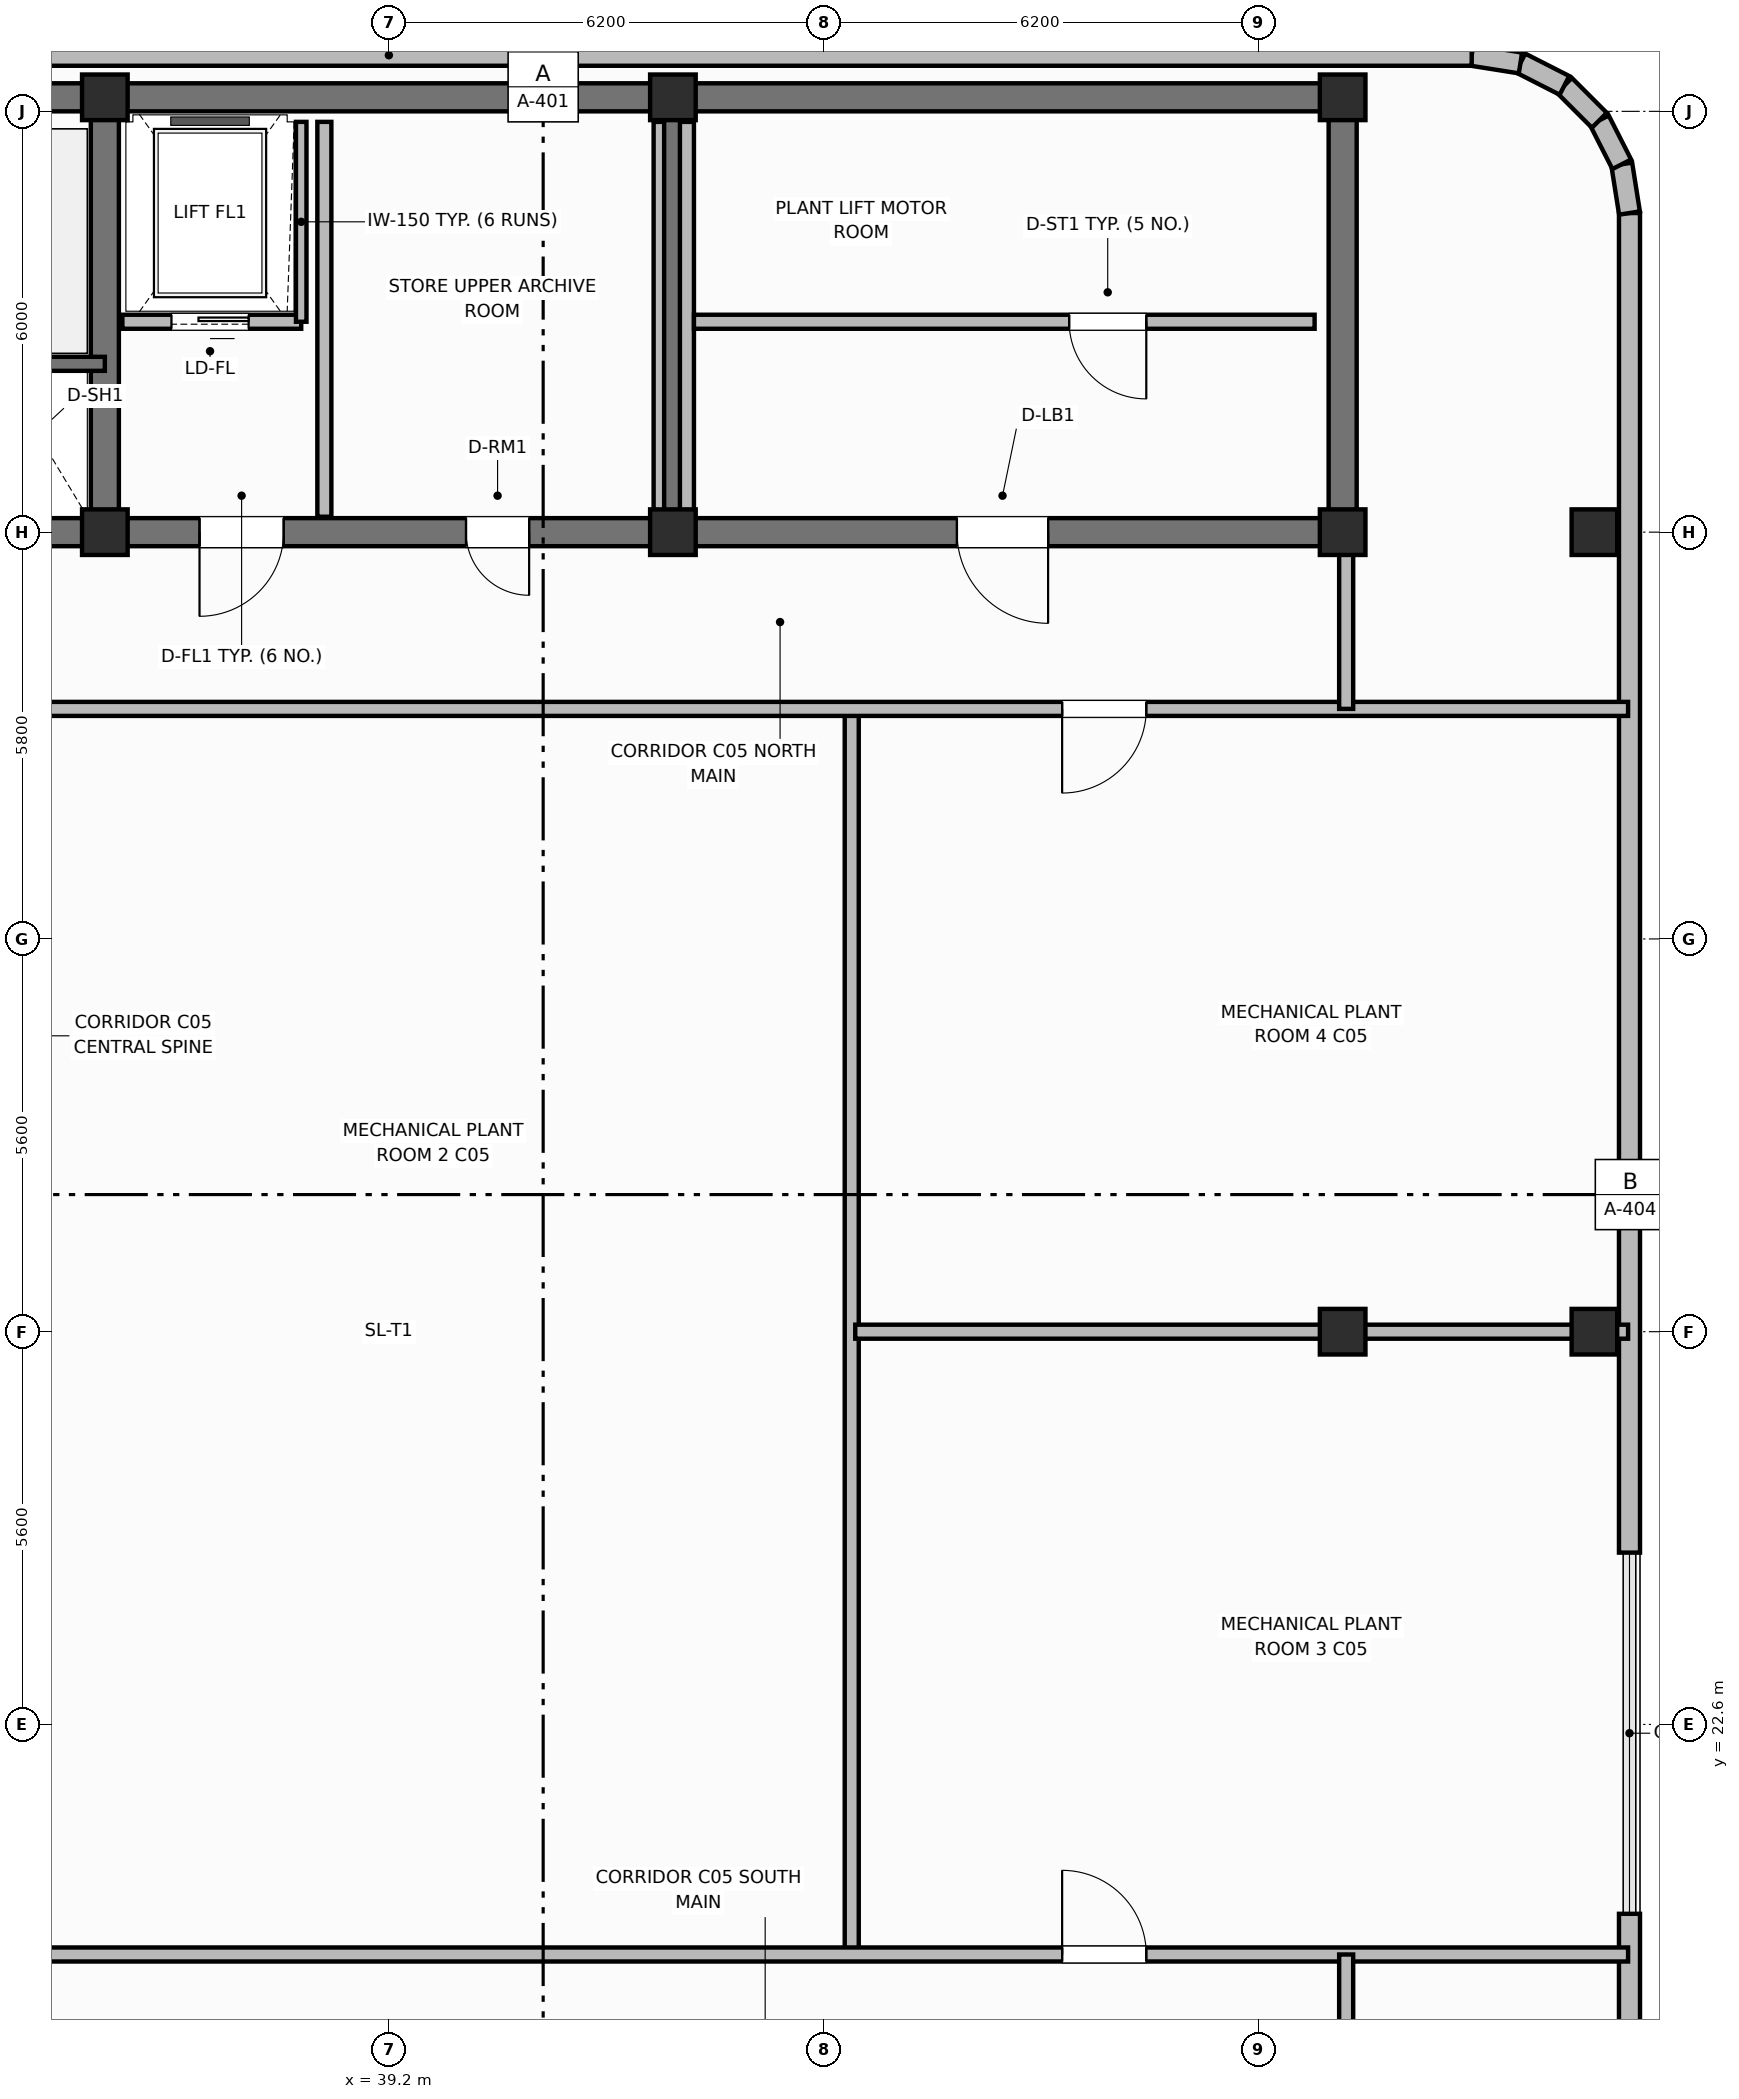
"""IFC4 building model, lengths in metres.
Left out: names, types, materials, properties, quantities, classifications, styles, units other than length and angle.
Written with IfcOpenShell. Run it as: python <this file> out.ifc"""

import sys

from ifc_helpers import new_model, si_unit, direction, frame, frame_2d, origin, origin_2d, place, context, subcontext, project, spatial, rectangle, extrude, element, fill, save


model = new_model("IFC4")
c1 = context("Model", 3, precision=1e-05, world=origin(), true_north=direction((0.0, 1.0)))
c2 = subcontext(c1, "Body", "Model", "MODEL_VIEW")
j1 = project(units=[si_unit("LENGTHUNIT", "METRE"), si_unit("PLANEANGLEUNIT", "RADIAN")], contexts=[c1])
p1 = place(None, origin())
s1 = spatial("IfcSite", under=j1, at=p1, CompositionType="ELEMENT")
p2 = place(p1, origin())
s2 = spatial("IfcBuilding", under=s1, at=p2, CompositionType="ELEMENT")
p3 = place(p2, frame((0.0, 0.0, 316.4)))
s3 = spatial("IfcBuildingStorey", under=s2, at=p3, CompositionType="ELEMENT", Elevation=316.4)
p4 = place(p3, frame((25.6, 45.8, 0.0), z_axis=(0.0, 0.0, 1.0), x_axis=(1.0, 0.0, 0.0)))
e1 = element("IfcWall", 1, at=p4, inside=s3, PredefinedType="SHEAR", context=c2, shape_type="SweptSolid", body=[
    extrude(rectangle(XDim=27.2, YDim=0.4, at=frame_2d((13.6, 0.0))), origin(), (0.0, 0.0, 1.0), 3.6),
])
p5 = place(p3, frame((52.8, 39.8, 0.0), z_axis=(0.0, 0.0, 1.0), x_axis=(0.0, 1.0, 0.0)))
e2 = element("IfcWall", 2, at=p5, inside=s3, PredefinedType="SHEAR", context=c2, shape_type="SweptSolid", body=[
    extrude(rectangle(XDim=5.8, YDim=0.4, at=frame_2d((2.9, 0.0))), origin(), (0.0, 0.0, 1.0), 3.6),
])
p6 = place(p3, frame((52.8, 39.6, 0.0), z_axis=(0.0, 0.0, 1.0), x_axis=(-1.0, 0.0, 0.0)))
e3 = element("IfcWall", 3, at=p6, inside=s3, PredefinedType="SHEAR", context=c2, shape_type="SweptSolid", body=[
    extrude(rectangle(XDim=27.2, YDim=0.4, at=frame_2d((13.6, 0.0))), origin(), (0.0, 0.0, 1.0), 3.6),
])
p7 = place(p6, frame((24.2, 0.0, 0.0)))
e4 = element("IfcOpeningElement", 4, at=p7, cuts=e3, PredefinedType="OPENING", context=c2, shape_type="SweptSolid", body=[
    extrude(rectangle(XDim=1.1, YDim=2.15, at=frame_2d((0.55, 1.075))), frame((0.0, 0.21, 0.0), z_axis=(0.0, -1.0, 0.0), x_axis=(1.0, 0.0, 0.0)), (0.0, 0.0, 1.0), 0.42),
])
p8 = place(p6, frame((15.1, 0.0, 0.0)))
e5 = element("IfcOpeningElement", 5, at=p8, cuts=e3, PredefinedType="OPENING", context=c2, shape_type="SweptSolid", body=[
    extrude(rectangle(XDim=1.2, YDim=2.15, at=frame_2d((0.6, 1.075))), frame((0.0, 0.21, 0.0), z_axis=(0.0, -1.0, 0.0), x_axis=(1.0, 0.0, 0.0)), (0.0, 0.0, 1.0), 0.42),
])
p9 = place(p6, frame((11.6, 0.0, 0.0)))
e6 = element("IfcOpeningElement", 6, at=p9, cuts=e3, PredefinedType="OPENING", context=c2, shape_type="SweptSolid", body=[
    extrude(rectangle(XDim=0.9, YDim=2.1, at=frame_2d((0.45, 1.05))), frame((0.0, 0.21, 0.0), z_axis=(0.0, -1.0, 0.0), x_axis=(1.0, 0.0, 0.0)), (0.0, 0.0, 1.0), 0.42),
])
p10 = place(p6, frame((4.2, 0.0, 0.0)))
e7 = element("IfcOpeningElement", 7, at=p10, cuts=e3, PredefinedType="OPENING", context=c2, shape_type="SweptSolid", body=[
    extrude(rectangle(XDim=1.3, YDim=2.2, at=frame_2d((0.65, 1.1))), frame((0.0, 0.21, 0.0), z_axis=(0.0, -1.0, 0.0), x_axis=(1.0, 0.0, 0.0)), (0.0, 0.0, 1.0), 0.42),
])
for number, where, z_axis, x_axis in (
    (8, (35.15, 39.8, 0.0), (0.0, 0.0, 1.0), (0.0, 1.0, 0.0)),
    (9, (43.25, 39.8, 0.0), (0.0, 0.0, 1.0), (0.0, 1.0, 0.0)),
):
    element("IfcWall", number, at=place(p3, frame(where, z_axis=z_axis, x_axis=x_axis)), inside=s3, PredefinedType="SHEAR", context=c2, shape_type="SweptSolid", body=[
        extrude(rectangle(XDim=5.8, YDim=0.4, at=frame_2d((2.9, 0.0))), origin(), (0.0, 0.0, 1.0), 3.6),
    ])
for number, where, z_axis, x_axis in (
    (10, (35.15, 39.6, 0.0), (0.0, 0.0, 1.0), (1.0, 0.0, 0.0)),
    (11, (35.15, 45.8, 0.0), (0.0, 0.0, 1.0), (1.0, 0.0, 0.0)),
    (12, (43.25, 39.6, 0.0), (0.0, 0.0, 1.0), (1.0, 0.0, 0.0)),
    (13, (43.25, 45.8, 0.0), (0.0, 0.0, 1.0), (1.0, 0.0, 0.0)),
    (14, (52.8, 39.6, 0.0), (0.0, 0.0, 1.0), (1.0, 0.0, 0.0)),
    (15, (52.8, 45.8, 0.0), (0.0, 0.0, 1.0), (1.0, 0.0, 0.0)),
    (16, (52.8, 28.2, 0.0), (0.0, 0.0, 1.0), (1.0, 0.0, 0.0)),
    (17, (56.39, 28.2, 0.0), (0.0, 0.0, 1.0), (1.0, 0.0, 0.0)),
    (18, (56.39, 39.6, 0.0), (0.0, 0.0, 1.0), (1.0, 0.0, 0.0)),
):
    element("IfcColumn", number, at=place(p3, frame(where, z_axis=z_axis, x_axis=x_axis)), inside=s3, PredefinedType="COLUMN", context=c2, shape_type="SweptSolid", body=[
        extrude(rectangle(XDim=0.65, YDim=0.65, at=origin_2d()), origin(), (0.0, 0.0, 1.0), 3.6),
    ])
p11 = place(p3, frame((56.89, 12.25, 0.0), z_axis=(0.0, 0.0, 1.0), x_axis=(0.0, 1.0, 0.0)))
e19 = element("IfcWall", 19, at=p11, inside=s3, PredefinedType="SOLIDWALL", context=c2, shape_type="SweptSolid", body=[
    extrude(rectangle(XDim=7.65, YDim=0.3, at=frame_2d((3.825, 0.0))), origin(), (0.0, 0.0, 1.0), 2.84),
])
p12 = place(p3, frame((56.89, 25.05, 0.0), z_axis=(0.0, 0.0, 1.0), x_axis=(0.0, 1.0, 0.0)))
e20 = element("IfcWall", 20, at=p12, inside=s3, PredefinedType="SOLIDWALL", context=c2, shape_type="SweptSolid", body=[
    extrude(rectangle(XDim=19.1, YDim=0.3, at=frame_2d((9.55, 0.0))), origin(), (0.0, 0.0, 1.0), 2.84),
])
for number, where, z_axis, x_axis in (
    (21, (56.89, 44.15, 0.0), (0.0, 0.0, 1.0), (-0.156, 0.988, 0.0)),
    (22, (56.78, 44.845, 0.0), (0.0, 0.0, 1.0), (-0.454, 0.891, 0.0)),
):
    element("IfcWall", number, at=place(p3, frame(where, z_axis=z_axis, x_axis=x_axis)), inside=s3, PredefinedType="SOLIDWALL", context=c2, shape_type="SweptSolid", body=[
        extrude(rectangle(XDim=0.704, YDim=0.3, at=frame_2d((0.352, 0.0))), origin(), (0.0, 0.0, 1.0), 2.84),
    ])
p13 = place(p3, frame((56.46, 45.472, 0.0), z_axis=(0.0, 0.0, 1.0), x_axis=(-0.707106781187, 0.707106781187, 0.0)))
e23 = element("IfcWall", 23, at=p13, inside=s3, PredefinedType="SOLIDWALL", context=c2, shape_type="SweptSolid", body=[
    extrude(rectangle(XDim=0.704, YDim=0.3, at=frame_2d((0.352, 0.0))), origin(), (0.0, 0.0, 1.0), 2.84),
])
for number, where, z_axis, x_axis in (
    (24, (55.962, 45.97, 0.0), (0.0, 0.0, 1.0), (-0.891, 0.454, 0.0)),
    (25, (55.335, 46.29, 0.0), (0.0, 0.0, 1.0), (-0.988, 0.156, 0.0)),
):
    element("IfcWall", number, at=place(p3, frame(where, z_axis=z_axis, x_axis=x_axis)), inside=s3, PredefinedType="SOLIDWALL", context=c2, shape_type="SweptSolid", body=[
        extrude(rectangle(XDim=0.704, YDim=0.3, at=frame_2d((0.352, 0.0))), origin(), (0.0, 0.0, 1.0), 2.84),
    ])
p14 = place(p3, frame((54.64, 46.4, 0.0), z_axis=(0.0, 0.0, 1.0), x_axis=(-1.0, 0.0, 0.0)))
e26 = element("IfcWall", 26, at=p14, inside=s3, PredefinedType="SOLIDWALL", context=c2, shape_type="SweptSolid", body=[
    extrude(rectangle(XDim=30.88, YDim=0.3, at=frame_2d((15.44, 0.0))), origin(), (0.0, 0.0, 1.0), 2.84),
])
p15 = place(p3, frame((35.15, 42.0, 0.0), z_axis=(0.0, 0.0, 1.0), x_axis=(-1.0, 0.0, 0.0)))
e27 = element("IfcWall", 27, at=p15, inside=s3, PredefinedType="SHEAR", context=c2, shape_type="SweptSolid", body=[
    extrude(rectangle(XDim=9.55, YDim=0.2, at=frame_2d((4.775, 0.0))), origin(), (0.0, 0.0, 1.0), 3.6),
])
p16 = place(p15, frame((7.25, 0.0, 0.0)))
e28 = element("IfcOpeningElement", 28, at=p16, cuts=e27, PredefinedType="OPENING", context=c2, shape_type="SweptSolid", body=[
    extrude(rectangle(XDim=1.1, YDim=2.15, at=frame_2d((0.55, 1.075))), frame((0.0, 0.11, 0.0), z_axis=(0.0, -1.0, 0.0), x_axis=(1.0, 0.0, 0.0)), (0.0, 0.0, 1.0), 0.22),
])
p17 = place(p3, frame((37.95, 42.6, 0.0), z_axis=(0.0, 0.0, 1.0), x_axis=(-1.0, 0.0, 0.0)))
e29 = element("IfcWall", 29, at=p17, inside=s3, PredefinedType="PARTITIONING", context=c2, shape_type="SweptSolid", body=[
    extrude(rectangle(XDim=2.55, YDim=0.2, at=frame_2d((1.275, 0.0))), origin(), (0.0, 0.0, 1.0), 2.2),
])
p18 = place(p17, frame((0.75, 0.0, 0.0)))
e30 = element("IfcOpeningElement", 30, at=p18, cuts=e29, PredefinedType="OPENING", context=c2, shape_type="SweptSolid", body=[
    extrude(rectangle(XDim=1.1, YDim=2.15, at=frame_2d((0.55, 1.075))), frame((0.0, 0.11, 0.0), z_axis=(0.0, -1.0, 0.0), x_axis=(1.0, 0.0, 0.0)), (0.0, 0.0, 1.0), 0.22),
])
p19 = place(p3, frame((37.95, 42.6, 0.0), z_axis=(0.0, 0.0, 1.0), x_axis=(0.0, 1.0, 0.0)))
e31 = element("IfcWall", 31, at=p19, inside=s3, PredefinedType="PARTITIONING", context=c2, shape_type="SweptSolid", body=[
    extrude(rectangle(XDim=2.85, YDim=0.15, at=frame_2d((1.425, 0.0))), origin(), (0.0, 0.0, 1.0), 2.54),
])
p20 = place(p3, frame((38.28, 39.82, 0.0), z_axis=(0.0, 0.0, 1.0), x_axis=(0.0, 1.0, 0.0)))
e32 = element("IfcWall", 32, at=p20, inside=s3, PredefinedType="PARTITIONING", context=c2, shape_type="SweptSolid", body=[
    extrude(rectangle(XDim=5.63, YDim=0.2, at=frame_2d((2.815, 0.0))), origin(), (0.0, 0.0, 1.0), 2.54),
])
p21 = place(p3, frame((43.05, 39.82, 0.0), z_axis=(0.0, 0.0, 1.0), x_axis=(0.0, 1.0, 0.0)))
e33 = element("IfcWall", 33, at=p21, inside=s3, PredefinedType="PARTITIONING", context=c2, shape_type="SweptSolid", body=[
    extrude(rectangle(XDim=5.63, YDim=0.15, at=frame_2d((2.815, 0.0))), origin(), (0.0, 0.0, 1.0), 2.54),
])
p22 = place(p3, frame((43.45, 39.82, 0.0), z_axis=(0.0, 0.0, 1.0), x_axis=(0.0, 1.0, 0.0)))
e34 = element("IfcWall", 34, at=p22, inside=s3, PredefinedType="PARTITIONING", context=c2, shape_type="SweptSolid", body=[
    extrude(rectangle(XDim=5.63, YDim=0.2, at=frame_2d((2.815, 0.0))), origin(), (0.0, 0.0, 1.0), 2.54),
])
p23 = place(p3, frame((52.4, 42.6, 0.0), z_axis=(0.0, 0.0, 1.0), x_axis=(-1.0, 0.0, 0.0)))
e35 = element("IfcWall", 35, at=p23, inside=s3, PredefinedType="PARTITIONING", context=c2, shape_type="SweptSolid", body=[
    extrude(rectangle(XDim=8.85, YDim=0.2, at=frame_2d((4.425, 0.0))), origin(), (0.0, 0.0, 1.0), 2.54),
])
p24 = place(p23, frame((2.4, 0.0, 0.0)))
e36 = element("IfcOpeningElement", 36, at=p24, cuts=e35, PredefinedType="OPENING", context=c2, shape_type="SweptSolid", body=[
    extrude(rectangle(XDim=1.1, YDim=2.15, at=frame_2d((0.55, 1.075))), frame((0.0, 0.11, 0.0), z_axis=(0.0, -1.0, 0.0), x_axis=(1.0, 0.0, 0.0)), (0.0, 0.0, 1.0), 0.22),
])
p25 = place(p3, frame((45.8, 19.35, 0.0), z_axis=(0.0, 0.0, 1.0), x_axis=(0.0, 1.0, 0.0)))
e37 = element("IfcWall", 37, at=p25, inside=s3, PredefinedType="PARTITIONING", context=c2, shape_type="SweptSolid", body=[
    extrude(rectangle(XDim=17.7, YDim=0.2, at=frame_2d((8.85, 0.0))), origin(), (0.0, 0.0, 1.0), 2.54),
])
p26 = place(p3, frame((45.85, 28.2, 0.0), z_axis=(0.0, 0.0, 1.0), x_axis=(1.0, 0.0, 0.0)))
e38 = element("IfcWall", 38, at=p26, inside=s3, PredefinedType="PARTITIONING", context=c2, shape_type="SweptSolid", body=[
    extrude(rectangle(XDim=11.02, YDim=0.2, at=frame_2d((5.51, 0.0))), origin(), (0.0, 0.0, 1.0), 2.54),
])
p27 = place(p3, frame((34.05, 19.32, 0.0), z_axis=(0.0, 0.0, 1.0), x_axis=(1.0, 0.0, 0.0)))
e39 = element("IfcWall", 39, at=p27, inside=s3, PredefinedType="PARTITIONING", context=c2, shape_type="SweptSolid", body=[
    extrude(rectangle(XDim=22.82, YDim=0.2, at=frame_2d((11.41, 0.0))), origin(), (0.0, 0.0, 1.0), 2.54),
])
p28 = place(p27, frame((14.75, 0.0, 0.0)))
e40 = element("IfcOpeningElement", 40, at=p28, cuts=e39, PredefinedType="OPENING", context=c2, shape_type="SweptSolid", body=[
    extrude(rectangle(XDim=1.2, YDim=2.15, at=frame_2d((0.6, 1.075))), frame((0.0, 0.11, 0.0), z_axis=(0.0, -1.0, 0.0), x_axis=(1.0, 0.0, 0.0)), (0.0, 0.0, 1.0), 0.22),
])
p29 = place(p3, frame((56.87, 37.08, 0.0), z_axis=(0.0, 0.0, 1.0), x_axis=(-1.0, 0.0, 0.0)))
e41 = element("IfcWall", 41, at=p29, inside=s3, PredefinedType="PARTITIONING", context=c2, shape_type="SweptSolid", body=[
    extrude(rectangle(XDim=22.82, YDim=0.2, at=frame_2d((11.41, 0.0))), origin(), (0.0, 0.0, 1.0), 2.54),
])
p30 = place(p29, frame((6.87, 0.0, 0.0)))
e42 = element("IfcOpeningElement", 42, at=p30, cuts=e41, PredefinedType="OPENING", context=c2, shape_type="SweptSolid", body=[
    extrude(rectangle(XDim=1.2, YDim=2.15, at=frame_2d((0.6, 1.075))), frame((0.0, 0.11, 0.0), z_axis=(0.0, -1.0, 0.0), x_axis=(1.0, 0.0, 0.0)), (0.0, 0.0, 1.0), 0.22),
])
p31 = place(p3, frame((52.85, 16.95, 0.0), z_axis=(0.0, 0.0, 1.0), x_axis=(0.0, 1.0, 0.0)))
e43 = element("IfcWall", 43, at=p31, inside=s3, PredefinedType="PARTITIONING", context=c2, shape_type="SweptSolid", body=[
    extrude(rectangle(XDim=2.37, YDim=0.2, at=frame_2d((1.185, 0.0))), origin(), (0.0, 0.0, 1.0), 2.54),
])
p32 = place(p3, frame((52.85, 37.08, 0.0), z_axis=(0.0, 0.0, 1.0), x_axis=(0.0, 1.0, 0.0)))
e44 = element("IfcWall", 44, at=p32, inside=s3, PredefinedType="PARTITIONING", context=c2, shape_type="SweptSolid", body=[
    extrude(rectangle(XDim=2.37, YDim=0.2, at=frame_2d((1.185, 0.0))), origin(), (0.0, 0.0, 1.0), 2.54),
])
p33 = place(p18, origin())
e45 = element("IfcDoor", 45, at=p33, inside=s3, OperationType="SLIDING_TO_LEFT", PredefinedType="DOOR", context=c2, shape_type="SweptSolid", body=[
    extrude(rectangle(XDim=1.1, YDim=2.15, at=frame_2d((0.55, 1.075))), frame((0.0, 0.025, 0.0), z_axis=(0.0, -1.0, 0.0), x_axis=(1.0, 0.0, 0.0)), (0.0, 0.0, 1.0), 0.05),
])
fill(e30, e45)
p34 = place(p24, origin())
e46 = element("IfcDoor", 46, at=p34, inside=s3, OperationType="SINGLE_SWING_LEFT", PredefinedType="DOOR", context=c2, shape_type="SweptSolid", body=[
    extrude(rectangle(XDim=1.1, YDim=2.15, at=frame_2d((0.55, 1.075))), frame((0.0, 0.025, 0.0), z_axis=(0.0, -1.0, 0.0), x_axis=(1.0, 0.0, 0.0)), (0.0, 0.0, 1.0), 0.05),
])
fill(e36, e46)
p35 = place(p28, origin())
e47 = element("IfcDoor", 47, at=p35, inside=s3, OperationType="SINGLE_SWING_LEFT", PredefinedType="DOOR", context=c2, shape_type="SweptSolid", body=[
    extrude(rectangle(XDim=1.2, YDim=2.15, at=frame_2d((0.6, 1.075))), frame((0.0, 0.025, 0.0), z_axis=(0.0, -1.0, 0.0), x_axis=(1.0, 0.0, 0.0)), (0.0, 0.0, 1.0), 0.05),
])
fill(e40, e47)
p36 = place(p30, origin())
e48 = element("IfcDoor", 48, at=p36, inside=s3, OperationType="SINGLE_SWING_RIGHT", PredefinedType="DOOR", context=c2, shape_type="SweptSolid", body=[
    extrude(rectangle(XDim=1.2, YDim=2.15, at=frame_2d((0.6, 1.075))), frame((0.0, 0.025, 0.0), z_axis=(0.0, -1.0, 0.0), x_axis=(1.0, 0.0, 0.0)), (0.0, 0.0, 1.0), 0.05),
])
fill(e42, e48)
p37 = place(p8, origin())
e49 = element("IfcDoor", 49, at=p37, inside=s3, OperationType="SINGLE_SWING_RIGHT", PredefinedType="DOOR", context=c2, shape_type="SweptSolid", body=[
    extrude(rectangle(XDim=1.2, YDim=2.15, at=frame_2d((0.6, 1.075))), frame((0.0, 0.025, 0.0), z_axis=(0.0, -1.0, 0.0), x_axis=(1.0, 0.0, 0.0)), (0.0, 0.0, 1.0), 0.05),
])
fill(e5, e49)
p38 = place(p9, origin())
e50 = element("IfcDoor", 50, at=p38, inside=s3, OperationType="SINGLE_SWING_LEFT", PredefinedType="DOOR", context=c2, shape_type="SweptSolid", body=[
    extrude(rectangle(XDim=0.9, YDim=2.1, at=frame_2d((0.45, 1.05))), frame((0.0, 0.025, 0.0), z_axis=(0.0, -1.0, 0.0), x_axis=(1.0, 0.0, 0.0)), (0.0, 0.0, 1.0), 0.05),
])
fill(e6, e50)
p39 = place(p10, origin())
e51 = element("IfcDoor", 51, at=p39, inside=s3, OperationType="SINGLE_SWING_LEFT", PredefinedType="DOOR", context=c2, shape_type="SweptSolid", body=[
    extrude(rectangle(XDim=1.3, YDim=2.2, at=frame_2d((0.65, 1.1))), frame((0.0, 0.025, 0.0), z_axis=(0.0, -1.0, 0.0), x_axis=(1.0, 0.0, 0.0)), (0.0, 0.0, 1.0), 0.05),
])
fill(e7, e51)
save(model, sys.argv[1])
